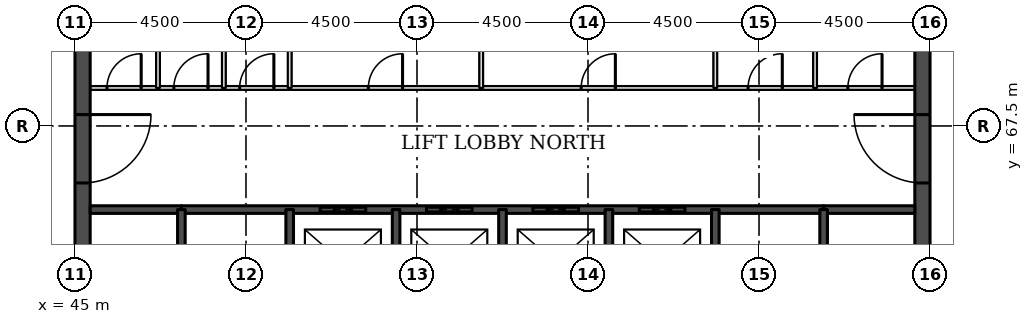
"""IFC4 building model, lengths in metres.
Left out: names, types, materials, properties, quantities, classifications, styles, units other than length and angle.
Written with IfcOpenShell. Run it as: python <this file> out.ifc"""

import sys

from ifc_helpers import new_model, si_unit, direction, frame, frame_2d, origin, place, context, subcontext, project, spatial, rectangle, extrude, element, fill, save


model = new_model("IFC4")
c1 = context("Model", 3, precision=1e-05, world=origin(), true_north=direction((0.0, 1.0)))
c2 = subcontext(c1, "Body", "Model", "MODEL_VIEW")
j1 = project(units=[si_unit("LENGTHUNIT", "METRE"), si_unit("PLANEANGLEUNIT", "RADIAN")], contexts=[c1])
p1 = place(None, origin())
s1 = spatial("IfcSite", under=j1, at=p1, CompositionType="ELEMENT")
p2 = place(p1, origin())
s2 = spatial("IfcBuilding", under=s1, at=p2, CompositionType="ELEMENT")
p3 = place(p2, frame((0.0, 0.0, 245.2)))
s3 = spatial("IfcBuildingStorey", under=s2, at=p3, CompositionType="ELEMENT", Elevation=245.2)
p4 = place(p3, frame((45.2, 49.5, 0.0), z_axis=(0.0, 0.0, 1.0), x_axis=(0.0, 1.0, 0.0)))
e1 = element("IfcWall", 1, at=p4, inside=s3, PredefinedType="SHEAR", context=c2, shape_type="SweptSolid", body=[
    extrude(rectangle(XDim=22.5, YDim=0.4, at=frame_2d((11.25, 0.0))), origin(), (0.0, 0.0, 1.0), 3.7),
])
p5 = place(p4, frame((4.2, 0.0, 0.0)))
e2 = element("IfcOpeningElement", 2, at=p5, cuts=e1, PredefinedType="OPENING", context=c2, shape_type="SweptSolid", body=[
    extrude(rectangle(XDim=1.8, YDim=2.1, at=frame_2d((0.9, 1.05))), frame((0.0, 0.21, 0.0), z_axis=(0.0, -1.0, 0.0), x_axis=(1.0, 0.0, 0.0)), (0.0, 0.0, 1.0), 0.42),
])
p6 = place(p4, frame((6.9, 0.0, 0.0)))
e3 = element("IfcOpeningElement", 3, at=p6, cuts=e1, PredefinedType="OPENING", context=c2, shape_type="SweptSolid", body=[
    extrude(rectangle(XDim=1.1, YDim=2.1, at=frame_2d((0.55, 1.05))), frame((0.0, 0.21, 0.0), z_axis=(0.0, -1.0, 0.0), x_axis=(1.0, 0.0, 0.0)), (0.0, 0.0, 1.0), 0.42),
])
p7 = place(p4, frame((13.6, 0.0, 0.0)))
e4 = element("IfcOpeningElement", 4, at=p7, cuts=e1, PredefinedType="OPENING", context=c2, shape_type="SweptSolid", body=[
    extrude(rectangle(XDim=1.1, YDim=2.1, at=frame_2d((0.55, 1.05))), frame((0.0, 0.21, 0.0), z_axis=(0.0, -1.0, 0.0), x_axis=(1.0, 0.0, 0.0)), (0.0, 0.0, 1.0), 0.42),
])
p8 = place(p4, frame((16.5, 0.0, 0.0)))
e5 = element("IfcOpeningElement", 5, at=p8, cuts=e1, PredefinedType="OPENING", context=c2, shape_type="SweptSolid", body=[
    extrude(rectangle(XDim=1.8, YDim=2.1, at=frame_2d((0.9, 1.05))), frame((0.0, 0.21, 0.0), z_axis=(0.0, -1.0, 0.0), x_axis=(1.0, 0.0, 0.0)), (0.0, 0.0, 1.0), 0.42),
])
p9 = place(p3, frame((67.3, 49.5, 0.0), z_axis=(0.0, 0.0, 1.0), x_axis=(0.0, 1.0, 0.0)))
e6 = element("IfcWall", 6, at=p9, inside=s3, PredefinedType="SHEAR", context=c2, shape_type="SweptSolid", body=[
    extrude(rectangle(XDim=22.5, YDim=0.4, at=frame_2d((11.25, 0.0))), origin(), (0.0, 0.0, 1.0), 3.7),
])
p10 = place(p9, frame((4.2, 0.0, 0.0)))
e7 = element("IfcOpeningElement", 7, at=p10, cuts=e6, PredefinedType="OPENING", context=c2, shape_type="SweptSolid", body=[
    extrude(rectangle(XDim=1.8, YDim=2.1, at=frame_2d((0.9, 1.05))), frame((0.0, 0.21, 0.0), z_axis=(0.0, -1.0, 0.0), x_axis=(1.0, 0.0, 0.0)), (0.0, 0.0, 1.0), 0.42),
])
p11 = place(p9, frame((6.9, 0.0, 0.0)))
e8 = element("IfcOpeningElement", 8, at=p11, cuts=e6, PredefinedType="OPENING", context=c2, shape_type="SweptSolid", body=[
    extrude(rectangle(XDim=1.1, YDim=2.1, at=frame_2d((0.55, 1.05))), frame((0.0, 0.21, 0.0), z_axis=(0.0, -1.0, 0.0), x_axis=(1.0, 0.0, 0.0)), (0.0, 0.0, 1.0), 0.42),
])
p12 = place(p9, frame((13.6, 0.0, 0.0)))
e9 = element("IfcOpeningElement", 9, at=p12, cuts=e6, PredefinedType="OPENING", context=c2, shape_type="SweptSolid", body=[
    extrude(rectangle(XDim=1.1, YDim=2.1, at=frame_2d((0.55, 1.05))), frame((0.0, 0.21, 0.0), z_axis=(0.0, -1.0, 0.0), x_axis=(1.0, 0.0, 0.0)), (0.0, 0.0, 1.0), 0.42),
])
p13 = place(p9, frame((16.5, 0.0, 0.0)))
e10 = element("IfcOpeningElement", 10, at=p13, cuts=e6, PredefinedType="OPENING", context=c2, shape_type="SweptSolid", body=[
    extrude(rectangle(XDim=1.8, YDim=2.1, at=frame_2d((0.9, 1.05))), frame((0.0, 0.21, 0.0), z_axis=(0.0, -1.0, 0.0), x_axis=(1.0, 0.0, 0.0)), (0.0, 0.0, 1.0), 0.42),
])
for number, where, z_axis, x_axis in (
    (11, (45.4, 65.3, 0.0), (0.0, 0.0, 1.0), (1.0, 0.0, 0.0)),
    (12, (64.7, 65.3, 0.0), (0.0, 0.0, 1.0), (1.0, 0.0, 0.0)),
):
    element("IfcWall", number, at=place(p3, frame(where, z_axis=z_axis, x_axis=x_axis)), inside=s3, PredefinedType="SOLIDWALL", context=c2, shape_type="SweptSolid", body=[
        extrude(rectangle(XDim=2.4, YDim=0.2, at=frame_2d((1.2, 0.0))), origin(), (0.0, 0.0, 1.0), 3.55),
    ])
p14 = place(p3, frame((47.8, 65.3, 0.0), z_axis=(0.0, 0.0, 1.0), x_axis=(1.0, 0.0, 0.0)))
e13 = element("IfcWall", 13, at=p14, inside=s3, PredefinedType="SOLIDWALL", context=c2, shape_type="SweptSolid", body=[
    extrude(rectangle(XDim=16.9, YDim=0.2, at=frame_2d((8.45, 0.0))), origin(), (0.0, 0.0, 1.0), 3.55),
])
p15 = place(p14, frame((3.65, 0.0, 0.0)))
e14 = element("IfcOpeningElement", 14, at=p15, cuts=e13, PredefinedType="OPENING", context=c2, shape_type="SweptSolid", body=[
    extrude(rectangle(XDim=1.2, YDim=2.1, at=frame_2d((0.6, 1.05))), frame((0.0, 0.11, 0.0), z_axis=(0.0, -1.0, 0.0), x_axis=(1.0, 0.0, 0.0)), (0.0, 0.0, 1.0), 0.22),
])
p16 = place(p14, frame((6.45, 0.0, 0.0)))
e15 = element("IfcOpeningElement", 15, at=p16, cuts=e13, PredefinedType="OPENING", context=c2, shape_type="SweptSolid", body=[
    extrude(rectangle(XDim=1.2, YDim=2.1, at=frame_2d((0.6, 1.05))), frame((0.0, 0.11, 0.0), z_axis=(0.0, -1.0, 0.0), x_axis=(1.0, 0.0, 0.0)), (0.0, 0.0, 1.0), 0.22),
])
p17 = place(p14, frame((9.25, 0.0, 0.0)))
e16 = element("IfcOpeningElement", 16, at=p17, cuts=e13, PredefinedType="OPENING", context=c2, shape_type="SweptSolid", body=[
    extrude(rectangle(XDim=1.2, YDim=2.1, at=frame_2d((0.6, 1.05))), frame((0.0, 0.11, 0.0), z_axis=(0.0, -1.0, 0.0), x_axis=(1.0, 0.0, 0.0)), (0.0, 0.0, 1.0), 0.22),
])
p18 = place(p14, frame((12.05, 0.0, 0.0)))
e17 = element("IfcOpeningElement", 17, at=p18, cuts=e13, PredefinedType="OPENING", context=c2, shape_type="SweptSolid", body=[
    extrude(rectangle(XDim=1.2, YDim=2.1, at=frame_2d((0.6, 1.05))), frame((0.0, 0.11, 0.0), z_axis=(0.0, -1.0, 0.0), x_axis=(1.0, 0.0, 0.0)), (0.0, 0.0, 1.0), 0.22),
])
p19 = place(p3, frame((45.4, 68.5, 0.0), z_axis=(0.0, 0.0, 1.0), x_axis=(1.0, 0.0, 0.0)))
e18 = element("IfcWall", 18, at=p19, inside=s3, PredefinedType="PARTITIONING", context=c2, shape_type="SweptSolid", body=[
    extrude(rectangle(XDim=21.7, YDim=0.1, at=frame_2d((10.85, 0.0))), origin(), (0.0, 0.0, 1.0), 3.55),
])
p20 = place(p19, frame((19.938, 0.0, 0.0)))
e19 = element("IfcOpeningElement", 19, at=p20, cuts=e18, PredefinedType="OPENING", context=c2, shape_type="SweptSolid", body=[
    extrude(rectangle(XDim=0.9, YDim=2.1, at=frame_2d((0.45, 1.05))), frame((0.0, 0.06, 0.0), z_axis=(0.0, -1.0, 0.0), x_axis=(1.0, 0.0, 0.0)), (0.0, 0.0, 1.0), 0.12),
])
p21 = place(p19, frame((17.312, 0.0, 0.0)))
e20 = element("IfcOpeningElement", 20, at=p21, cuts=e18, PredefinedType="OPENING", context=c2, shape_type="SweptSolid", body=[
    extrude(rectangle(XDim=0.9, YDim=2.1, at=frame_2d((0.45, 1.05))), frame((0.0, 0.06, 0.0), z_axis=(0.0, -1.0, 0.0), x_axis=(1.0, 0.0, 0.0)), (0.0, 0.0, 1.0), 0.12),
])
p22 = place(p19, frame((0.442, 0.0, 0.0)))
e21 = element("IfcOpeningElement", 21, at=p22, cuts=e18, PredefinedType="OPENING", context=c2, shape_type="SweptSolid", body=[
    extrude(rectangle(XDim=0.9, YDim=2.1, at=frame_2d((0.45, 1.05))), frame((0.0, 0.06, 0.0), z_axis=(0.0, -1.0, 0.0), x_axis=(1.0, 0.0, 0.0)), (0.0, 0.0, 1.0), 0.12),
])
p23 = place(p19, frame((2.201, 0.0, 0.0)))
e22 = element("IfcOpeningElement", 22, at=p23, cuts=e18, PredefinedType="OPENING", context=c2, shape_type="SweptSolid", body=[
    extrude(rectangle(XDim=0.9, YDim=2.1, at=frame_2d((0.45, 1.05))), frame((0.0, 0.06, 0.0), z_axis=(0.0, -1.0, 0.0), x_axis=(1.0, 0.0, 0.0)), (0.0, 0.0, 1.0), 0.12),
])
p24 = place(p19, frame((3.934, 0.0, 0.0)))
e23 = element("IfcOpeningElement", 23, at=p24, cuts=e18, PredefinedType="OPENING", context=c2, shape_type="SweptSolid", body=[
    extrude(rectangle(XDim=0.9, YDim=2.1, at=frame_2d((0.45, 1.05))), frame((0.0, 0.06, 0.0), z_axis=(0.0, -1.0, 0.0), x_axis=(1.0, 0.0, 0.0)), (0.0, 0.0, 1.0), 0.12),
])
p25 = place(p19, frame((12.92, 0.0, 0.0)))
e24 = element("IfcOpeningElement", 24, at=p25, cuts=e18, PredefinedType="OPENING", context=c2, shape_type="SweptSolid", body=[
    extrude(rectangle(XDim=0.9, YDim=2.1, at=frame_2d((0.45, 1.05))), frame((0.0, 0.06, 0.0), z_axis=(0.0, -1.0, 0.0), x_axis=(1.0, 0.0, 0.0)), (0.0, 0.0, 1.0), 0.12),
])
p26 = place(p19, frame((7.32, 0.0, 0.0)))
e25 = element("IfcOpeningElement", 25, at=p26, cuts=e18, PredefinedType="OPENING", context=c2, shape_type="SweptSolid", body=[
    extrude(rectangle(XDim=0.9, YDim=2.1, at=frame_2d((0.45, 1.05))), frame((0.0, 0.06, 0.0), z_axis=(0.0, -1.0, 0.0), x_axis=(1.0, 0.0, 0.0)), (0.0, 0.0, 1.0), 0.12),
])
p27 = place(p3, frame((47.185, 68.5, 0.0), z_axis=(0.0, 0.0, 1.0), x_axis=(0.0, 1.0, 0.0)))
e26 = element("IfcWall", 26, at=p27, inside=s3, PredefinedType="PARTITIONING", context=c2, shape_type="SweptSolid", body=[
    extrude(rectangle(XDim=3.1, YDim=0.1, at=frame_2d((1.55, 0.0))), origin(), (0.0, 0.0, 1.0), 3.55),
])
p28 = place(p3, frame((47.8, 62.0, 0.0), z_axis=(0.0, 0.0, 1.0), x_axis=(0.0, 1.0, 0.0)))
e27 = element("IfcWall", 27, at=p28, inside=s3, PredefinedType="SOLIDWALL", context=c2, shape_type="SweptSolid", body=[
    extrude(rectangle(XDim=3.3, YDim=0.2, at=frame_2d((1.65, 0.0))), origin(), (0.0, 0.0, 1.0), 3.55),
])
p29 = place(p28, frame((1.1, 0.0, 0.0)))
e28 = element("IfcOpeningElement", 28, at=p29, cuts=e27, PredefinedType="OPENING", context=c2, shape_type="SweptSolid", body=[
    extrude(rectangle(XDim=1.1, YDim=2.1, at=frame_2d((0.55, 1.05))), frame((0.0, 0.11, 0.0), z_axis=(0.0, -1.0, 0.0), x_axis=(1.0, 0.0, 0.0)), (0.0, 0.0, 1.0), 0.22),
])
for number, where, z_axis, x_axis in (
    (29, (48.917, 68.5, 0.0), (0.0, 0.0, 1.0), (0.0, 1.0, 0.0)),
    (30, (50.65, 68.5, 0.0), (0.0, 0.0, 1.0), (0.0, 1.0, 0.0)),
):
    element("IfcWall", number, at=place(p3, frame(where, z_axis=z_axis, x_axis=x_axis)), inside=s3, PredefinedType="PARTITIONING", context=c2, shape_type="SweptSolid", body=[
        extrude(rectangle(XDim=3.1, YDim=0.1, at=frame_2d((1.55, 0.0))), origin(), (0.0, 0.0, 1.0), 3.55),
    ])
p30 = place(p3, frame((50.65, 62.0, 0.0), z_axis=(0.0, 0.0, 1.0), x_axis=(0.0, 1.0, 0.0)))
e31 = element("IfcWall", 31, at=p30, inside=s3, PredefinedType="SOLIDWALL", context=c2, shape_type="SweptSolid", body=[
    extrude(rectangle(XDim=3.3, YDim=0.2, at=frame_2d((1.65, 0.0))), origin(), (0.0, 0.0, 1.0), 3.55),
])
p31 = place(p3, frame((53.45, 62.5, 0.0), z_axis=(0.0, 0.0, 1.0), x_axis=(0.0, 1.0, 0.0)))
e32 = element("IfcWall", 32, at=p31, inside=s3, PredefinedType="SOLIDWALL", context=c2, shape_type="SweptSolid", body=[
    extrude(rectangle(XDim=2.8, YDim=0.2, at=frame_2d((1.4, 0.0))), origin(), (0.0, 0.0, 1.0), 3.55),
])
p32 = place(p3, frame((55.69, 68.5, 0.0), z_axis=(0.0, 0.0, 1.0), x_axis=(0.0, 1.0, 0.0)))
e33 = element("IfcWall", 33, at=p32, inside=s3, PredefinedType="PARTITIONING", context=c2, shape_type="SweptSolid", body=[
    extrude(rectangle(XDim=3.1, YDim=0.1, at=frame_2d((1.55, 0.0))), origin(), (0.0, 0.0, 1.0), 3.55),
])
for number, where, z_axis, x_axis in (
    (34, (56.25, 62.5, 0.0), (0.0, 0.0, 1.0), (0.0, 1.0, 0.0)),
    (35, (59.05, 62.5, 0.0), (0.0, 0.0, 1.0), (0.0, 1.0, 0.0)),
):
    element("IfcWall", number, at=place(p3, frame(where, z_axis=z_axis, x_axis=x_axis)), inside=s3, PredefinedType="SOLIDWALL", context=c2, shape_type="SweptSolid", body=[
        extrude(rectangle(XDim=2.8, YDim=0.2, at=frame_2d((1.4, 0.0))), origin(), (0.0, 0.0, 1.0), 3.55),
    ])
p33 = place(p3, frame((61.85, 68.5, 0.0), z_axis=(0.0, 0.0, 1.0), x_axis=(0.0, 1.0, 0.0)))
e36 = element("IfcWall", 36, at=p33, inside=s3, PredefinedType="PARTITIONING", context=c2, shape_type="SweptSolid", body=[
    extrude(rectangle(XDim=3.1, YDim=0.1, at=frame_2d((1.55, 0.0))), origin(), (0.0, 0.0, 1.0), 3.55),
])
p34 = place(p3, frame((61.85, 62.0, 0.0), z_axis=(0.0, 0.0, 1.0), x_axis=(0.0, 1.0, 0.0)))
e37 = element("IfcWall", 37, at=p34, inside=s3, PredefinedType="SOLIDWALL", context=c2, shape_type="SweptSolid", body=[
    extrude(rectangle(XDim=3.3, YDim=0.2, at=frame_2d((1.65, 0.0))), origin(), (0.0, 0.0, 1.0), 3.55),
])
p35 = place(p3, frame((64.475, 68.5, 0.0), z_axis=(0.0, 0.0, 1.0), x_axis=(0.0, 1.0, 0.0)))
e38 = element("IfcWall", 38, at=p35, inside=s3, PredefinedType="PARTITIONING", context=c2, shape_type="SweptSolid", body=[
    extrude(rectangle(XDim=3.1, YDim=0.1, at=frame_2d((1.55, 0.0))), origin(), (0.0, 0.0, 1.0), 3.55),
])
p36 = place(p3, frame((64.7, 62.0, 0.0), z_axis=(0.0, 0.0, 1.0), x_axis=(0.0, 1.0, 0.0)))
e39 = element("IfcWall", 39, at=p36, inside=s3, PredefinedType="SOLIDWALL", context=c2, shape_type="SweptSolid", body=[
    extrude(rectangle(XDim=3.3, YDim=0.2, at=frame_2d((1.65, 0.0))), origin(), (0.0, 0.0, 1.0), 3.55),
])
p37 = place(p36, frame((1.1, 0.0, 0.0)))
e40 = element("IfcOpeningElement", 40, at=p37, cuts=e39, PredefinedType="OPENING", context=c2, shape_type="SweptSolid", body=[
    extrude(rectangle(XDim=1.1, YDim=2.1, at=frame_2d((0.55, 1.05))), frame((0.0, 0.11, 0.0), z_axis=(0.0, -1.0, 0.0), x_axis=(1.0, 0.0, 0.0)), (0.0, 0.0, 1.0), 0.22),
])
p38 = place(p15, origin())
e41 = element("IfcDoor", 41, at=p38, inside=s3, OperationType="DOUBLE_DOOR_SLIDING", PredefinedType="DOOR", context=c2, shape_type="SweptSolid", body=[
    extrude(rectangle(XDim=1.2, YDim=2.1, at=frame_2d((0.6, 1.05))), frame((0.0, 0.025, 0.0), z_axis=(0.0, -1.0, 0.0), x_axis=(1.0, 0.0, 0.0)), (0.0, 0.0, 1.0), 0.05),
])
fill(e14, e41)
p39 = place(p16, origin())
e42 = element("IfcDoor", 42, at=p39, inside=s3, OperationType="DOUBLE_DOOR_SLIDING", PredefinedType="DOOR", context=c2, shape_type="SweptSolid", body=[
    extrude(rectangle(XDim=1.2, YDim=2.1, at=frame_2d((0.6, 1.05))), frame((0.0, 0.025, 0.0), z_axis=(0.0, -1.0, 0.0), x_axis=(1.0, 0.0, 0.0)), (0.0, 0.0, 1.0), 0.05),
])
fill(e15, e42)
p40 = place(p17, origin())
e43 = element("IfcDoor", 43, at=p40, inside=s3, OperationType="DOUBLE_DOOR_SLIDING", PredefinedType="DOOR", context=c2, shape_type="SweptSolid", body=[
    extrude(rectangle(XDim=1.2, YDim=2.1, at=frame_2d((0.6, 1.05))), frame((0.0, 0.025, 0.0), z_axis=(0.0, -1.0, 0.0), x_axis=(1.0, 0.0, 0.0)), (0.0, 0.0, 1.0), 0.05),
])
fill(e16, e43)
p41 = place(p18, origin())
e44 = element("IfcDoor", 44, at=p41, inside=s3, OperationType="DOUBLE_DOOR_SLIDING", PredefinedType="DOOR", context=c2, shape_type="SweptSolid", body=[
    extrude(rectangle(XDim=1.2, YDim=2.1, at=frame_2d((0.6, 1.05))), frame((0.0, 0.025, 0.0), z_axis=(0.0, -1.0, 0.0), x_axis=(1.0, 0.0, 0.0)), (0.0, 0.0, 1.0), 0.05),
])
fill(e17, e44)
p42 = place(p8, frame((1.8, 0.0, 0.0), z_axis=(0.0, 0.0, 1.0), x_axis=(-1.0, 0.0, 0.0)))
e45 = element("IfcDoor", 45, at=p42, inside=s3, OperationType="SINGLE_SWING_LEFT", PredefinedType="DOOR", context=c2, shape_type="SweptSolid", body=[
    extrude(rectangle(XDim=1.8, YDim=2.1, at=frame_2d((0.9, 1.05))), frame((0.0, 0.025, 0.0), z_axis=(0.0, -1.0, 0.0), x_axis=(1.0, 0.0, 0.0)), (0.0, 0.0, 1.0), 0.05),
])
fill(e5, e45)
p43 = place(p13, origin())
e46 = element("IfcDoor", 46, at=p43, inside=s3, OperationType="SINGLE_SWING_RIGHT", PredefinedType="DOOR", context=c2, shape_type="SweptSolid", body=[
    extrude(rectangle(XDim=1.8, YDim=2.1, at=frame_2d((0.9, 1.05))), frame((0.0, 0.025, 0.0), z_axis=(0.0, -1.0, 0.0), x_axis=(1.0, 0.0, 0.0)), (0.0, 0.0, 1.0), 0.05),
])
fill(e10, e46)
p44 = place(p20, origin())
e47 = element("IfcDoor", 47, at=p44, inside=s3, OperationType="SINGLE_SWING_RIGHT", PredefinedType="DOOR", context=c2, shape_type="SweptSolid", body=[
    extrude(rectangle(XDim=0.9, YDim=2.1, at=frame_2d((0.45, 1.05))), frame((0.0, 0.025, 0.0), z_axis=(0.0, -1.0, 0.0), x_axis=(1.0, 0.0, 0.0)), (0.0, 0.0, 1.0), 0.05),
])
fill(e19, e47)
p45 = place(p21, origin())
e48 = element("IfcDoor", 48, at=p45, inside=s3, OperationType="SINGLE_SWING_RIGHT", PredefinedType="DOOR", context=c2, shape_type="SweptSolid", body=[
    extrude(rectangle(XDim=0.9, YDim=2.1, at=frame_2d((0.45, 1.05))), frame((0.0, 0.025, 0.0), z_axis=(0.0, -1.0, 0.0), x_axis=(1.0, 0.0, 0.0)), (0.0, 0.0, 1.0), 0.05),
])
fill(e20, e48)
p46 = place(p22, origin())
e49 = element("IfcDoor", 49, at=p46, inside=s3, OperationType="SINGLE_SWING_RIGHT", PredefinedType="DOOR", context=c2, shape_type="SweptSolid", body=[
    extrude(rectangle(XDim=0.9, YDim=2.1, at=frame_2d((0.45, 1.05))), frame((0.0, 0.025, 0.0), z_axis=(0.0, -1.0, 0.0), x_axis=(1.0, 0.0, 0.0)), (0.0, 0.0, 1.0), 0.05),
])
fill(e21, e49)
p47 = place(p23, origin())
e50 = element("IfcDoor", 50, at=p47, inside=s3, OperationType="SINGLE_SWING_RIGHT", PredefinedType="DOOR", context=c2, shape_type="SweptSolid", body=[
    extrude(rectangle(XDim=0.9, YDim=2.1, at=frame_2d((0.45, 1.05))), frame((0.0, 0.025, 0.0), z_axis=(0.0, -1.0, 0.0), x_axis=(1.0, 0.0, 0.0)), (0.0, 0.0, 1.0), 0.05),
])
fill(e22, e50)
p48 = place(p24, origin())
e51 = element("IfcDoor", 51, at=p48, inside=s3, OperationType="SINGLE_SWING_RIGHT", PredefinedType="DOOR", context=c2, shape_type="SweptSolid", body=[
    extrude(rectangle(XDim=0.9, YDim=2.1, at=frame_2d((0.45, 1.05))), frame((0.0, 0.025, 0.0), z_axis=(0.0, -1.0, 0.0), x_axis=(1.0, 0.0, 0.0)), (0.0, 0.0, 1.0), 0.05),
])
fill(e23, e51)
p49 = place(p25, origin())
e52 = element("IfcDoor", 52, at=p49, inside=s3, OperationType="SINGLE_SWING_RIGHT", PredefinedType="DOOR", context=c2, shape_type="SweptSolid", body=[
    extrude(rectangle(XDim=0.9, YDim=2.1, at=frame_2d((0.45, 1.05))), frame((0.0, 0.025, 0.0), z_axis=(0.0, -1.0, 0.0), x_axis=(1.0, 0.0, 0.0)), (0.0, 0.0, 1.0), 0.05),
])
fill(e24, e52)
p50 = place(p26, origin())
e53 = element("IfcDoor", 53, at=p50, inside=s3, OperationType="SINGLE_SWING_RIGHT", PredefinedType="DOOR", context=c2, shape_type="SweptSolid", body=[
    extrude(rectangle(XDim=0.9, YDim=2.1, at=frame_2d((0.45, 1.05))), frame((0.0, 0.025, 0.0), z_axis=(0.0, -1.0, 0.0), x_axis=(1.0, 0.0, 0.0)), (0.0, 0.0, 1.0), 0.05),
])
fill(e25, e53)
save(model, sys.argv[1])
